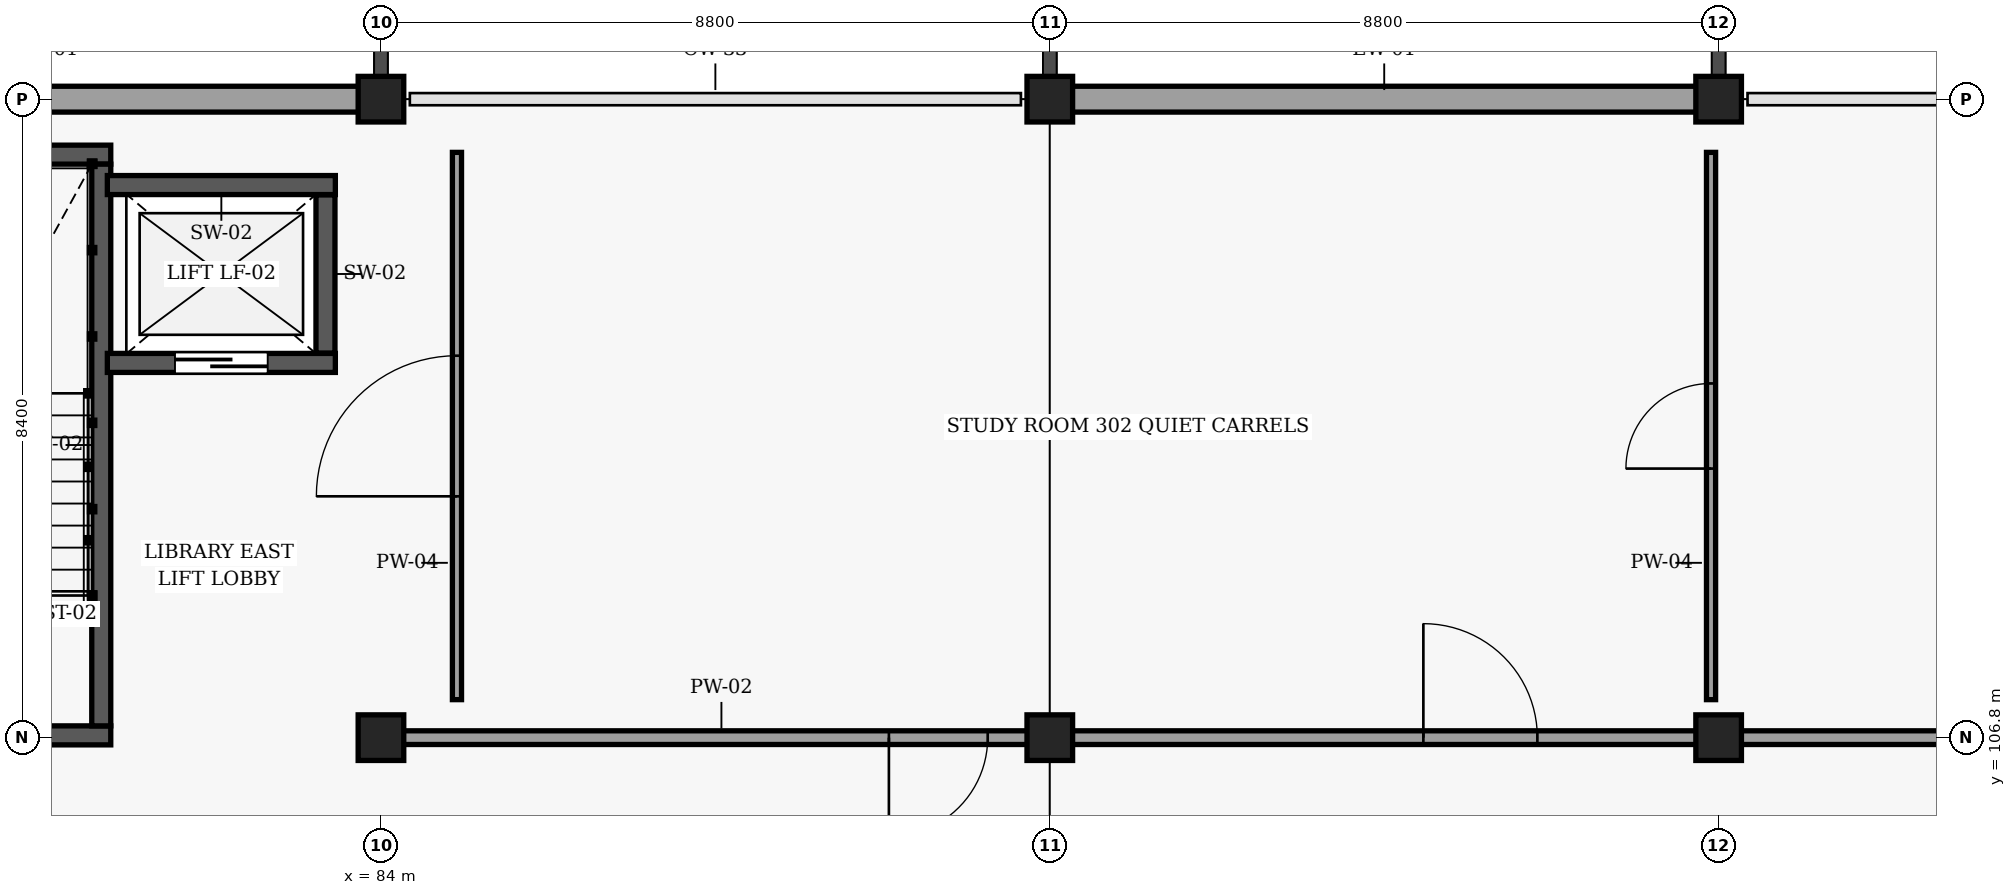
"""IFC4 building model, lengths in metres.
Left out: names, types, materials, properties, quantities, classifications, styles, units other than length and angle.
Written with IfcOpenShell. Run it as: python <this file> out.ifc"""

import sys

from ifc_helpers import new_model, si_unit, direction, frame, frame_2d, origin, origin_2d, place, context, subcontext, project, spatial, rectangle, extrude, element, fill, save


model = new_model("IFC4")
c1 = context("Model", 3, precision=1e-05, world=origin(), true_north=direction((0.0, 1.0)))
c2 = subcontext(c1, "Body", "Model", "MODEL_VIEW")
j1 = project(units=[si_unit("LENGTHUNIT", "METRE"), si_unit("PLANEANGLEUNIT", "RADIAN")], contexts=[c1])
p1 = place(None, origin())
s1 = spatial("IfcSite", under=j1, at=p1, CompositionType="ELEMENT")
p2 = place(p1, origin())
s2 = spatial("IfcBuilding", under=s1, at=p2, CompositionType="ELEMENT")
p3 = place(p2, frame((0.0, 0.0, 12.9)))
s3 = spatial("IfcBuildingStorey", under=s2, at=p3, CompositionType="ELEMENT", Elevation=12.9)
for number, where, z_axis, x_axis in (
    (1, (84.0, 106.8, 0.0), (0.0, 0.0, 1.0), (1.0, 0.0, 0.0)),
    (2, (84.0, 115.2, 0.0), (0.0, 0.0, 1.0), (1.0, 0.0, 0.0)),
    (3, (92.8, 106.8, 0.0), (0.0, 0.0, 1.0), (1.0, 0.0, 0.0)),
    (4, (92.8, 115.2, 0.0), (0.0, 0.0, 1.0), (1.0, 0.0, 0.0)),
    (5, (101.6, 106.8, 0.0), (0.0, 0.0, 1.0), (1.0, 0.0, 0.0)),
    (6, (101.6, 115.2, 0.0), (0.0, 0.0, 1.0), (1.0, 0.0, 0.0)),
):
    element("IfcColumn", number, at=place(p3, frame(where, z_axis=z_axis, x_axis=x_axis)), inside=s3, PredefinedType="COLUMN", context=c2, shape_type="SweptSolid", body=[
        extrude(rectangle(XDim=0.6, YDim=0.6, at=origin_2d()), origin(), (0.0, 0.0, 1.0), 3.6),
    ])
p4 = place(p3, frame((75.3, 115.2, 0.0), z_axis=(0.0, 0.0, 1.0), x_axis=(1.0, 0.0, 0.0)))
e7 = element("IfcWall", 7, at=p4, inside=s3, PredefinedType="SOLIDWALL", context=c2, shape_type="SweptSolid", body=[
    extrude(rectangle(XDim=8.6, YDim=0.34, at=frame_2d((4.3, 0.0))), origin(), (0.0, 0.0, 1.0), 2.885),
])
p5 = place(p3, frame((92.9, 115.2, 0.0), z_axis=(0.0, 0.0, 1.0), x_axis=(1.0, 0.0, 0.0)))
e8 = element("IfcWall", 8, at=p5, inside=s3, PredefinedType="SOLIDWALL", context=c2, shape_type="SweptSolid", body=[
    extrude(rectangle(XDim=8.6, YDim=0.34, at=frame_2d((4.3, 0.0))), origin(), (0.0, 0.0, 1.0), 2.885),
])
p6 = place(p3, frame((80.445, 106.83, 0.0), z_axis=(0.0, 0.0, 1.0), x_axis=(-1.0, 0.0, 0.0)))
e9 = element("IfcWall", 9, at=p6, inside=s3, PredefinedType="SHEAR", context=c2, shape_type="SweptSolid", body=[
    extrude(rectangle(XDim=3.61, YDim=0.25, at=frame_2d((1.805, 0.0))), origin(), (0.0, 0.0, 1.0), 3.38),
])
p7 = place(p6, frame((1.235, 0.0, 0.0)))
e10 = element("IfcOpeningElement", 10, at=p7, cuts=e9, PredefinedType="OPENING", context=c2, shape_type="SweptSolid", body=[
    extrude(rectangle(XDim=1.14, YDim=2.15, at=frame_2d((0.57, 1.075))), frame((0.0, 0.135, 0.0), z_axis=(0.0, -1.0, 0.0), x_axis=(1.0, 0.0, 0.0)), (0.0, 0.0, 1.0), 0.27),
])
p8 = place(p3, frame((76.835, 114.47, 0.0), z_axis=(0.0, 0.0, 1.0), x_axis=(1.0, 0.0, 0.0)))
e11 = element("IfcWall", 11, at=p8, inside=s3, PredefinedType="SHEAR", context=c2, shape_type="SweptSolid", body=[
    extrude(rectangle(XDim=3.61, YDim=0.25, at=frame_2d((1.805, 0.0))), origin(), (0.0, 0.0, 1.0), 3.38),
])
p9 = place(p3, frame((80.32, 114.345, 0.0), z_axis=(0.0, 0.0, 1.0), x_axis=(0.0, -1.0, 0.0)))
e12 = element("IfcWall", 12, at=p9, inside=s3, PredefinedType="SHEAR", context=c2, shape_type="SweptSolid", body=[
    extrude(rectangle(XDim=7.39, YDim=0.25, at=frame_2d((3.695, 0.0))), origin(), (0.0, 0.0, 1.0), 3.38),
])
p10 = place(p3, frame((80.4, 111.73, 0.0), z_axis=(0.0, 0.0, 1.0), x_axis=(1.0, 0.0, 0.0)))
e13 = element("IfcWall", 13, at=p10, inside=s3, PredefinedType="SHEAR", context=c2, shape_type="SweptSolid", body=[
    extrude(rectangle(XDim=3.0, YDim=0.25, at=frame_2d((1.5, 0.0))), origin(), (0.0, 0.0, 1.0), 3.38),
])
p11 = place(p10, frame((0.89, 0.0, 0.0)))
e14 = element("IfcOpeningElement", 14, at=p11, cuts=e13, PredefinedType="OPENING", context=c2, shape_type="SweptSolid", body=[
    extrude(rectangle(XDim=1.22, YDim=2.18, at=frame_2d((0.61, 1.09))), frame((0.0, 0.135, 0.0), z_axis=(0.0, -1.0, 0.0), x_axis=(1.0, 0.0, 0.0)), (0.0, 0.0, 1.0), 0.27),
])
p12 = place(p3, frame((83.4, 114.07, 0.0), z_axis=(0.0, 0.0, 1.0), x_axis=(-1.0, 0.0, 0.0)))
e15 = element("IfcWall", 15, at=p12, inside=s3, PredefinedType="SHEAR", context=c2, shape_type="SweptSolid", body=[
    extrude(rectangle(XDim=3.0, YDim=0.25, at=frame_2d((1.5, 0.0))), origin(), (0.0, 0.0, 1.0), 3.38),
])
p13 = place(p3, frame((83.27, 111.86, 0.0), z_axis=(0.0, 0.0, 1.0), x_axis=(0.0, 1.0, 0.0)))
e16 = element("IfcWall", 16, at=p13, inside=s3, PredefinedType="SHEAR", context=c2, shape_type="SweptSolid", body=[
    extrude(rectangle(XDim=2.08, YDim=0.25, at=frame_2d((1.04, 0.0))), origin(), (0.0, 0.0, 1.0), 3.38),
])
p14 = place(p3, frame((84.2, 106.8, 0.0), z_axis=(0.0, 0.0, 1.0), x_axis=(1.0, 0.0, 0.0)))
e17 = element("IfcWall", 17, at=p14, inside=s3, PredefinedType="PARTITIONING", context=c2, shape_type="SweptSolid", body=[
    extrude(rectangle(XDim=28.53, YDim=0.18, at=frame_2d((14.265, 0.0))), origin(), (0.0, 0.0, 1.0), 2.615),
])
p15 = place(p14, frame((6.483, 0.0, 0.0)))
e18 = element("IfcOpeningElement", 18, at=p15, cuts=e17, PredefinedType="OPENING", context=c2, shape_type="SweptSolid", body=[
    extrude(rectangle(XDim=1.3, YDim=2.2, at=frame_2d((0.65, 1.1))), frame((0.0, 0.1, 0.0), z_axis=(0.0, -1.0, 0.0), x_axis=(1.0, 0.0, 0.0)), (0.0, 0.0, 1.0), 0.2),
])
p16 = place(p14, frame((13.515, 0.0, 0.0)))
e19 = element("IfcOpeningElement", 19, at=p16, cuts=e17, PredefinedType="OPENING", context=c2, shape_type="SweptSolid", body=[
    extrude(rectangle(XDim=1.5, YDim=2.25, at=frame_2d((0.75, 1.125))), frame((0.0, 0.1, 0.0), z_axis=(0.0, -1.0, 0.0), x_axis=(1.0, 0.0, 0.0)), (0.0, 0.0, 1.0), 0.2),
])
p17 = place(p14, frame((20.777, 0.0, 0.0)))
e20 = element("IfcOpeningElement", 20, at=p17, cuts=e17, PredefinedType="OPENING", context=c2, shape_type="SweptSolid", body=[
    extrude(rectangle(XDim=1.24, YDim=2.2, at=frame_2d((0.62, 1.1))), frame((0.0, 0.1, 0.0), z_axis=(0.0, -1.0, 0.0), x_axis=(1.0, 0.0, 0.0)), (0.0, 0.0, 1.0), 0.2),
])
p18 = place(p3, frame((85.0, 107.3, 0.0), z_axis=(0.0, 0.0, 1.0), x_axis=(0.0, 1.0, 0.0)))
e21 = element("IfcWall", 21, at=p18, inside=s3, PredefinedType="PARTITIONING", context=c2, shape_type="SweptSolid", body=[
    extrude(rectangle(XDim=7.2, YDim=0.12, at=frame_2d((3.6, 0.0))), origin(), (0.0, 0.0, 1.0), 3.365),
])
p19 = place(p18, frame((2.675, 0.0, 0.0)))
e22 = element("IfcOpeningElement", 22, at=p19, cuts=e21, PredefinedType="OPENING", context=c2, shape_type="SweptSolid", body=[
    extrude(rectangle(XDim=1.85, YDim=2.22, at=frame_2d((0.925, 1.11))), frame((0.0, 0.07, 0.0), z_axis=(0.0, -1.0, 0.0), x_axis=(1.0, 0.0, 0.0)), (0.0, 0.0, 1.0), 0.14),
])
p20 = place(p3, frame((101.5, 107.3, 0.0), z_axis=(0.0, 0.0, 1.0), x_axis=(0.0, 1.0, 0.0)))
e23 = element("IfcWall", 23, at=p20, inside=s3, PredefinedType="PARTITIONING", context=c2, shape_type="SweptSolid", body=[
    extrude(rectangle(XDim=7.2, YDim=0.12, at=frame_2d((3.6, 0.0))), origin(), (0.0, 0.0, 1.0), 2.715),
])
p21 = place(p20, frame((3.04, 0.0, 0.0)))
e24 = element("IfcOpeningElement", 24, at=p21, cuts=e23, PredefinedType="OPENING", context=c2, shape_type="SweptSolid", body=[
    extrude(rectangle(XDim=1.12, YDim=2.16, at=frame_2d((0.56, 1.08))), frame((0.0, 0.07, 0.0), z_axis=(0.0, -1.0, 0.0), x_axis=(1.0, 0.0, 0.0)), (0.0, 0.0, 1.0), 0.14),
])
p22 = place(p11, origin())
e25 = element("IfcDoor", 25, at=p22, inside=s3, OperationType="SLIDING_TO_RIGHT", PredefinedType="DOOR", context=c2, shape_type="SweptSolid", body=[
    extrude(rectangle(XDim=1.22, YDim=2.18, at=frame_2d((0.61, 1.09))), frame((0.0, 0.025, 0.0), z_axis=(0.0, -1.0, 0.0), x_axis=(1.0, 0.0, 0.0)), (0.0, 0.0, 1.0), 0.05),
])
fill(e14, e25)
p23 = place(p15, origin())
e26 = element("IfcDoor", 26, at=p23, inside=s3, OperationType="SINGLE_SWING_RIGHT", PredefinedType="DOOR", context=c2, shape_type="SweptSolid", body=[
    extrude(rectangle(XDim=1.3, YDim=2.2, at=frame_2d((0.65, 1.1))), frame((0.0, 0.025, 0.0), z_axis=(0.0, -1.0, 0.0), x_axis=(1.0, 0.0, 0.0)), (0.0, 0.0, 1.0), 0.05),
])
fill(e18, e26)
p24 = place(p16, origin())
e27 = element("IfcDoor", 27, at=p24, inside=s3, OperationType="DOUBLE_DOOR_SINGLE_SWING", PredefinedType="DOOR", context=c2, shape_type="SweptSolid", body=[
    extrude(rectangle(XDim=1.5, YDim=2.25, at=frame_2d((0.75, 1.125))), frame((0.0, 0.025, 0.0), z_axis=(0.0, -1.0, 0.0), x_axis=(1.0, 0.0, 0.0)), (0.0, 0.0, 1.0), 0.05),
])
fill(e19, e27)
p25 = place(p19, origin())
e28 = element("IfcDoor", 28, at=p25, inside=s3, OperationType="DOUBLE_DOOR_SINGLE_SWING", PredefinedType="DOOR", context=c2, shape_type="SweptSolid", body=[
    extrude(rectangle(XDim=1.85, YDim=2.22, at=frame_2d((0.925, 1.11))), frame((0.0, 0.025, 0.0), z_axis=(0.0, -1.0, 0.0), x_axis=(1.0, 0.0, 0.0)), (0.0, 0.0, 1.0), 0.05),
])
fill(e22, e28)
p26 = place(p21, origin())
e29 = element("IfcDoor", 29, at=p26, inside=s3, OperationType="SINGLE_SWING_LEFT", PredefinedType="DOOR", context=c2, shape_type="SweptSolid", body=[
    extrude(rectangle(XDim=1.12, YDim=2.16, at=frame_2d((0.56, 1.08))), frame((0.0, 0.025, 0.0), z_axis=(0.0, -1.0, 0.0), x_axis=(1.0, 0.0, 0.0)), (0.0, 0.0, 1.0), 0.05),
])
fill(e24, e29)
save(model, sys.argv[1])
